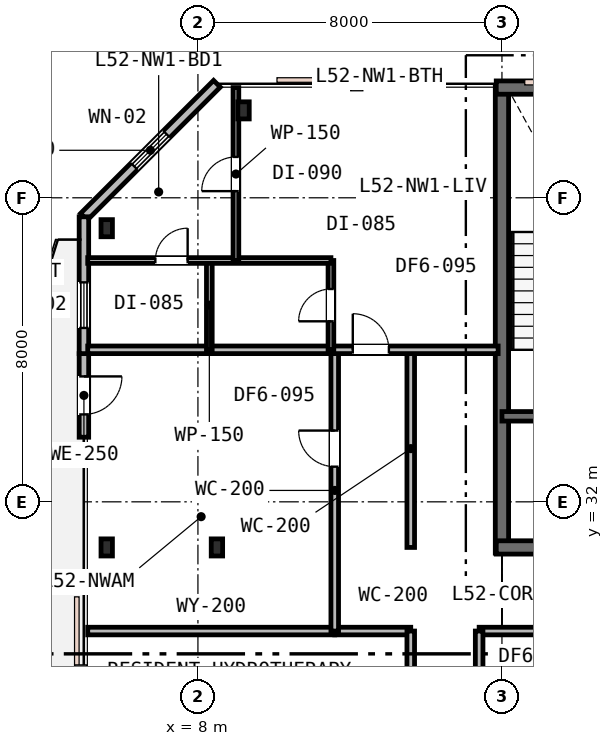
"""IFC4 building model, lengths in metres.
Left out: names, types, materials, properties, quantities, classifications, styles, units other than length and angle.
Written with IfcOpenShell. Run it as: python <this file> out.ifc"""

import sys

from ifc_helpers import new_model, si_unit, direction, frame, frame_2d, origin, origin_2d, place, context, subcontext, project, spatial, rectangle, i_section, extrude, element, fill, save


model = new_model("IFC4")
c1 = context("Model", 3, precision=1e-05, world=origin(), true_north=direction((0.0, 1.0)))
c2 = subcontext(c1, "Body", "Model", "MODEL_VIEW")
j1 = project(units=[si_unit("LENGTHUNIT", "METRE"), si_unit("PLANEANGLEUNIT", "RADIAN")], contexts=[c1])
p1 = place(None, origin())
s1 = spatial("IfcSite", under=j1, at=p1, CompositionType="ELEMENT")
p2 = place(p1, origin())
s2 = spatial("IfcBuilding", under=s1, at=p2, CompositionType="ELEMENT")
p3 = place(p2, frame((0.0, 0.0, 201.0)))
s3 = spatial("IfcBuildingStorey", under=s2, at=p3, CompositionType="ELEMENT", Elevation=201.0)
p4 = place(p3, frame((16.0, 30.65, 0.0), z_axis=(0.0, 0.0, 1.0), x_axis=(0.0, 1.0, 0.0)))
e1 = element("IfcWall", 1, at=p4, inside=s3, PredefinedType="SHEAR", context=c2, shape_type="SweptSolid", body=[
    extrude(rectangle(XDim=12.3, YDim=0.35, at=frame_2d((6.15, 0.0))), origin(), (0.0, 0.0, 1.0), 3.6),
])
p5 = place(p3, frame((15.85, 42.9, 0.0), z_axis=(0.0, 0.0, 1.0), x_axis=(1.0, 0.0, 0.0)))
e2 = element("IfcWall", 2, at=p5, inside=s3, PredefinedType="SHEAR", context=c2, shape_type="SweptSolid", body=[
    extrude(rectangle(XDim=24.3, YDim=0.35, at=frame_2d((12.15, 0.0))), origin(), (0.0, 0.0, 1.0), 3.6),
])
p6 = place(p3, frame((15.85, 30.8, 0.0), z_axis=(0.0, 0.0, 1.0), x_axis=(1.0, 0.0, 0.0)))
e3 = element("IfcWall", 3, at=p6, inside=s3, PredefinedType="SHEAR", context=c2, shape_type="SweptSolid", body=[
    extrude(rectangle(XDim=11.2, YDim=0.35, at=frame_2d((5.6, 0.0))), origin(), (0.0, 0.0, 1.0), 3.6),
])
p7 = place(p6, frame((2.45, 0.0, 0.0)))
e4 = element("IfcOpeningElement", 4, at=p7, cuts=e3, PredefinedType="OPENING", context=c2, shape_type="SweptSolid", body=[
    extrude(rectangle(XDim=1.1, YDim=2.15, at=frame_2d((0.55, 1.075))), frame((0.0, 0.185, 0.0), z_axis=(0.0, -1.0, 0.0), x_axis=(1.0, 0.0, 0.0)), (0.0, 0.0, 1.0), 0.37),
])
p8 = place(p3, frame((16.0, 34.25, 0.0), z_axis=(0.0, 0.0, 1.0), x_axis=(1.0, 0.0, 0.0)))
e5 = element("IfcWall", 5, at=p8, inside=s3, PredefinedType="SHEAR", context=c2, shape_type="SweptSolid", body=[
    extrude(rectangle(XDim=6.05, YDim=0.25, at=frame_2d((3.025, 0.0))), origin(), (0.0, 0.0, 1.0), 3.6),
])
p9 = place(p8, frame((1.25, 0.0, 0.0)))
e6 = element("IfcOpeningElement", 6, at=p9, cuts=e5, PredefinedType="OPENING", context=c2, shape_type="SweptSolid", body=[
    extrude(rectangle(XDim=1.0, YDim=2.15, at=frame_2d((0.5, 1.075))), frame((0.0, 0.135, 0.0), z_axis=(0.0, -1.0, 0.0), x_axis=(1.0, 0.0, 0.0)), (0.0, 0.0, 1.0), 0.27),
])
p10 = place(p8, frame((4.2, 0.0, 0.0)))
e7 = element("IfcOpeningElement", 7, at=p10, cuts=e5, PredefinedType="OPENING", context=c2, shape_type="SweptSolid", body=[
    extrude(rectangle(XDim=1.1, YDim=2.15, at=frame_2d((0.55, 1.075))), frame((0.0, 0.135, 0.0), z_axis=(0.0, -1.0, 0.0), x_axis=(1.0, 0.0, 0.0)), (0.0, 0.0, 1.0), 0.27),
])
for number, where, z_axis, x_axis in (
    (8, (5.6, 30.8, 0.0), (0.0, 0.0, 1.0), (1.0, 0.0, 0.0)),
    (9, (5.6, 39.2, 0.0), (0.0, 0.0, 1.0), (1.0, 0.0, 0.0)),
    (10, (8.5, 30.8, 0.0), (0.0, 0.0, 1.0), (1.0, 0.0, 0.0)),
    (11, (9.2, 42.3, 0.0), (0.0, 0.0, 1.0), (1.0, 0.0, 0.0)),
):
    element("IfcColumn", number, at=place(p3, frame(where, z_axis=z_axis, x_axis=x_axis)), inside=s3, PredefinedType="COLUMN", context=c2, shape_type="SweptSolid", body=[
        extrude(i_section(OverallWidth=0.3, OverallDepth=0.45, WebThickness=0.014, FlangeThickness=0.026, FilletRadius=0.027, at=origin_2d()), origin(), (0.0, 0.0, 1.0), 3.6),
    ])
p11 = place(p3, frame((8.5, 43.0, 0.0), z_axis=(0.0, 0.0, 1.0), x_axis=(-0.707106781187, -0.707106781187, 0.0)))
e12 = element("IfcWall", 12, at=p11, inside=s3, PredefinedType="STANDARD", context=c2, shape_type="SweptSolid", body=[
    extrude(rectangle(XDim=4.95, YDim=0.25, at=frame_2d((2.475, 0.0))), origin(), (0.0, 0.0, 1.0), 3.33),
])
p12 = place(p11, frame((1.875, 0.0, 0.85)))
e13 = element("IfcOpeningElement", 13, at=p12, cuts=e12, PredefinedType="OPENING", context=c2, shape_type="SweptSolid", body=[
    extrude(rectangle(XDim=1.2, YDim=1.6, at=frame_2d((0.6, 0.8))), frame((0.0, 0.135, 0.0), z_axis=(0.0, -1.0, 0.0), x_axis=(1.0, 0.0, 0.0)), (0.0, 0.0, 1.0), 0.27),
])
p13 = place(p3, frame((5.0, 35.9, 0.0), z_axis=(0.0, 0.0, 1.0), x_axis=(0.0, -1.0, 0.0)))
e14 = element("IfcWall", 14, at=p13, inside=s3, PredefinedType="STANDARD", context=c2, shape_type="SweptSolid", body=[
    extrude(rectangle(XDim=2.2, YDim=0.25, at=frame_2d((1.1, 0.0))), origin(), (0.0, 0.0, 1.0), 3.33),
])
p14 = place(p13, frame((0.6, 0.0, 0.0)))
e15 = element("IfcOpeningElement", 15, at=p14, cuts=e14, PredefinedType="OPENING", context=c2, shape_type="SweptSolid", body=[
    extrude(rectangle(XDim=1.0, YDim=2.15, at=frame_2d((0.5, 1.075))), frame((0.0, 0.135, 0.0), z_axis=(0.0, -1.0, 0.0), x_axis=(1.0, 0.0, 0.0)), (0.0, 0.0, 1.0), 0.27),
])
p15 = place(p3, frame((5.0, 39.5, 0.0), z_axis=(0.0, 0.0, 1.0), x_axis=(0.0, -1.0, 0.0)))
e16 = element("IfcWall", 16, at=p15, inside=s3, PredefinedType="STANDARD", context=c2, shape_type="SweptSolid", body=[
    extrude(rectangle(XDim=3.6, YDim=0.25, at=frame_2d((1.8, 0.0))), origin(), (0.0, 0.0, 1.0), 3.33),
])
p16 = place(p15, frame((1.725, 0.0, 0.85)))
e17 = element("IfcOpeningElement", 17, at=p16, cuts=e16, PredefinedType="OPENING", context=c2, shape_type="SweptSolid", body=[
    extrude(rectangle(XDim=1.2, YDim=1.6, at=frame_2d((0.6, 0.8))), frame((0.0, 0.135, 0.0), z_axis=(0.0, -1.0, 0.0), x_axis=(1.0, 0.0, 0.0)), (0.0, 0.0, 1.0), 0.27),
])
p17 = place(p3, frame((5.1, 28.6, 0.0), z_axis=(0.0, 0.0, 1.0), x_axis=(1.0, 0.0, 0.0)))
e18 = element("IfcWall", 18, at=p17, inside=s3, PredefinedType="PARTITIONING", context=c2, shape_type="SweptSolid", body=[
    extrude(rectangle(XDim=6.5, YDim=0.2, at=frame_2d((3.25, 0.0))), origin(), (0.0, 0.0, 1.0), 2.72),
])
p18 = place(p3, frame((11.6, 28.6, 0.0), z_axis=(0.0, 0.0, 1.0), x_axis=(1.0, 0.0, 0.0)))
e19 = element("IfcWall", 19, at=p18, inside=s3, PredefinedType="PARTITIONING", context=c2, shape_type="SweptSolid", body=[
    extrude(rectangle(XDim=2.0, YDim=0.2, at=frame_2d((1.0, 0.0))), origin(), (0.0, 0.0, 1.0), 3.33),
])
p19 = place(p3, frame((15.4, 28.6, 0.0), z_axis=(0.0, 0.0, 1.0), x_axis=(1.0, 0.0, 0.0)))
e20 = element("IfcWall", 20, at=p19, inside=s3, PredefinedType="PARTITIONING", context=c2, shape_type="SweptSolid", body=[
    extrude(rectangle(XDim=35.5, YDim=0.2, at=frame_2d((17.75, 0.0))), origin(), (0.0, 0.0, 1.0), 2.72),
])
p20 = place(p19, frame((11.525, 0.0, 0.0)))
e21 = element("IfcOpeningElement", 21, at=p20, cuts=e20, PredefinedType="OPENING", context=c2, shape_type="SweptSolid", body=[
    extrude(rectangle(XDim=0.95, YDim=2.15, at=frame_2d((0.475, 1.075))), frame((0.0, 0.11, 0.0), z_axis=(0.0, -1.0, 0.0), x_axis=(1.0, 0.0, 0.0)), (0.0, 0.0, 1.0), 0.22),
])
p21 = place(p19, frame((19.425, 0.0, 0.0)))
e22 = element("IfcOpeningElement", 22, at=p21, cuts=e20, PredefinedType="OPENING", context=c2, shape_type="SweptSolid", body=[
    extrude(rectangle(XDim=0.95, YDim=2.15, at=frame_2d((0.475, 1.075))), frame((0.0, 0.11, 0.0), z_axis=(0.0, -1.0, 0.0), x_axis=(1.0, 0.0, 0.0)), (0.0, 0.0, 1.0), 0.22),
])
p22 = place(p19, frame((26.275, 0.0, 0.0)))
e23 = element("IfcOpeningElement", 23, at=p22, cuts=e20, PredefinedType="OPENING", context=c2, shape_type="SweptSolid", body=[
    extrude(rectangle(XDim=0.95, YDim=2.15, at=frame_2d((0.475, 1.075))), frame((0.0, 0.11, 0.0), z_axis=(0.0, -1.0, 0.0), x_axis=(1.0, 0.0, 0.0)), (0.0, 0.0, 1.0), 0.22),
])
p23 = place(p3, frame((13.6, 30.8, 0.0), z_axis=(0.0, 0.0, 1.0), x_axis=(0.0, 1.0, 0.0)))
e24 = element("IfcWall", 24, at=p23, inside=s3, PredefinedType="PARTITIONING", context=c2, shape_type="SweptSolid", body=[
    extrude(rectangle(XDim=5.2, YDim=0.2, at=frame_2d((2.6, 0.0))), origin(), (0.0, 0.0, 1.0), 2.72),
])
p24 = place(p3, frame((11.6, 28.6, 0.0), z_axis=(0.0, 0.0, 1.0), x_axis=(0.0, 1.0, 0.0)))
e25 = element("IfcWall", 25, at=p24, inside=s3, PredefinedType="PARTITIONING", context=c2, shape_type="SweptSolid", body=[
    extrude(rectangle(XDim=7.4, YDim=0.2, at=frame_2d((3.7, 0.0))), origin(), (0.0, 0.0, 1.0), 2.72),
])
p25 = place(p24, frame((4.325, 0.0, 0.0)))
e26 = element("IfcOpeningElement", 26, at=p25, cuts=e25, PredefinedType="OPENING", context=c2, shape_type="SweptSolid", body=[
    extrude(rectangle(XDim=0.95, YDim=2.15, at=frame_2d((0.475, 1.075))), frame((0.0, 0.11, 0.0), z_axis=(0.0, -1.0, 0.0), x_axis=(1.0, 0.0, 0.0)), (0.0, 0.0, 1.0), 0.22),
])
p26 = place(p3, frame((5.1, 36.0, 0.0), z_axis=(0.0, 0.0, 1.0), x_axis=(1.0, 0.0, 0.0)))
e27 = element("IfcWall", 27, at=p26, inside=s3, PredefinedType="PARTITIONING", context=c2, shape_type="SweptSolid", body=[
    extrude(rectangle(XDim=10.8, YDim=0.2, at=frame_2d((5.4, 0.0))), origin(), (0.0, 0.0, 1.0), 3.04),
])
p27 = place(p26, frame((6.975, 0.0, 0.0)))
e28 = element("IfcOpeningElement", 28, at=p27, cuts=e27, PredefinedType="OPENING", context=c2, shape_type="SweptSolid", body=[
    extrude(rectangle(XDim=0.95, YDim=2.15, at=frame_2d((0.475, 1.075))), frame((0.0, 0.11, 0.0), z_axis=(0.0, -1.0, 0.0), x_axis=(1.0, 0.0, 0.0)), (0.0, 0.0, 1.0), 0.22),
])
p28 = place(p3, frame((11.5, 36.0, 0.0), z_axis=(0.0, 0.0, 1.0), x_axis=(0.0, 1.0, 0.0)))
e29 = element("IfcWall", 29, at=p28, inside=s3, PredefinedType="PARTITIONING", context=c2, shape_type="SweptSolid", body=[
    extrude(rectangle(XDim=2.35, YDim=0.15, at=frame_2d((1.175, 0.0))), origin(), (0.0, 0.0, 1.0), 3.33),
])
p29 = place(p28, frame((0.75, 0.0, 0.0)))
e30 = element("IfcOpeningElement", 30, at=p29, cuts=e29, PredefinedType="OPENING", context=c2, shape_type="SweptSolid", body=[
    extrude(rectangle(XDim=0.85, YDim=2.15, at=frame_2d((0.425, 1.075))), frame((0.0, 0.085, 0.0), z_axis=(0.0, -1.0, 0.0), x_axis=(1.0, 0.0, 0.0)), (0.0, 0.0, 1.0), 0.17),
])
p30 = place(p3, frame((8.3, 36.0, 0.0), z_axis=(0.0, 0.0, 1.0), x_axis=(0.0, 1.0, 0.0)))
e31 = element("IfcWall", 31, at=p30, inside=s3, PredefinedType="PARTITIONING", context=c2, shape_type="SweptSolid", body=[
    extrude(rectangle(XDim=2.35, YDim=0.15, at=frame_2d((1.175, 0.0))), origin(), (0.0, 0.0, 1.0), 3.33),
])
p31 = place(p3, frame((5.1, 38.35, 0.0), z_axis=(0.0, 0.0, 1.0), x_axis=(1.0, 0.0, 0.0)))
e32 = element("IfcWall", 32, at=p31, inside=s3, PredefinedType="PARTITIONING", context=c2, shape_type="SweptSolid", body=[
    extrude(rectangle(XDim=6.4, YDim=0.15, at=frame_2d((3.2, 0.0))), origin(), (0.0, 0.0, 1.0), 3.04),
])
p32 = place(p31, frame((1.78, 0.0, 0.0)))
e33 = element("IfcOpeningElement", 33, at=p32, cuts=e32, PredefinedType="OPENING", context=c2, shape_type="SweptSolid", body=[
    extrude(rectangle(XDim=0.85, YDim=2.15, at=frame_2d((0.425, 1.075))), frame((0.0, 0.085, 0.0), z_axis=(0.0, -1.0, 0.0), x_axis=(1.0, 0.0, 0.0)), (0.0, 0.0, 1.0), 0.17),
])
p33 = place(p3, frame((9.0, 38.35, 0.0), z_axis=(0.0, 0.0, 1.0), x_axis=(0.0, 1.0, 0.0)))
e34 = element("IfcWall", 34, at=p33, inside=s3, PredefinedType="PARTITIONING", context=c2, shape_type="SweptSolid", body=[
    extrude(rectangle(XDim=4.55, YDim=0.15, at=frame_2d((2.275, 0.0))), origin(), (0.0, 0.0, 1.0), 3.04),
])
p34 = place(p33, frame((1.825, 0.0, 0.0)))
e35 = element("IfcOpeningElement", 35, at=p34, cuts=e34, PredefinedType="OPENING", context=c2, shape_type="SweptSolid", body=[
    extrude(rectangle(XDim=0.9, YDim=2.15, at=frame_2d((0.45, 1.075))), frame((0.0, 0.085, 0.0), z_axis=(0.0, -1.0, 0.0), x_axis=(1.0, 0.0, 0.0)), (0.0, 0.0, 1.0), 0.17),
])
p35 = place(p3, frame((13.6, 17.0, 0.0), z_axis=(0.0, 0.0, 1.0), x_axis=(0.0, 1.0, 0.0)))
e36 = element("IfcWall", 36, at=p35, inside=s3, PredefinedType="PARTITIONING", context=c2, shape_type="SweptSolid", body=[
    extrude(rectangle(XDim=11.6, YDim=0.2, at=frame_2d((5.8, 0.0))), origin(), (0.0, 0.0, 1.0), 2.72),
])
p36 = place(p35, frame((8.996, 0.0, 0.0)))
e37 = element("IfcOpeningElement", 37, at=p36, cuts=e36, PredefinedType="OPENING", context=c2, shape_type="SweptSolid", body=[
    extrude(rectangle(XDim=0.95, YDim=2.15, at=frame_2d((0.475, 1.075))), frame((0.0, 0.11, 0.0), z_axis=(0.0, -1.0, 0.0), x_axis=(1.0, 0.0, 0.0)), (0.0, 0.0, 1.0), 0.22),
])
p37 = place(p35, frame((2.269, 0.0, 0.0)))
e38 = element("IfcOpeningElement", 38, at=p37, cuts=e36, PredefinedType="OPENING", context=c2, shape_type="SweptSolid", body=[
    extrude(rectangle(XDim=0.95, YDim=2.15, at=frame_2d((0.475, 1.075))), frame((0.0, 0.11, 0.0), z_axis=(0.0, -1.0, 0.0), x_axis=(1.0, 0.0, 0.0)), (0.0, 0.0, 1.0), 0.22),
])
p38 = place(p3, frame((15.4, 17.0, 0.0), z_axis=(0.0, 0.0, 1.0), x_axis=(0.0, 1.0, 0.0)))
e39 = element("IfcWall", 39, at=p38, inside=s3, PredefinedType="PARTITIONING", context=c2, shape_type="SweptSolid", body=[
    extrude(rectangle(XDim=11.6, YDim=0.2, at=frame_2d((5.8, 0.0))), origin(), (0.0, 0.0, 1.0), 2.72),
])
p39 = place(p38, frame((9.095, 0.0, 0.0)))
e40 = element("IfcOpeningElement", 40, at=p39, cuts=e39, PredefinedType="OPENING", context=c2, shape_type="SweptSolid", body=[
    extrude(rectangle(XDim=0.95, YDim=2.15, at=frame_2d((0.475, 1.075))), frame((0.0, 0.11, 0.0), z_axis=(0.0, -1.0, 0.0), x_axis=(1.0, 0.0, 0.0)), (0.0, 0.0, 1.0), 0.22),
])
p40 = place(p38, frame((3.295, 0.0, 0.0)))
e41 = element("IfcOpeningElement", 41, at=p40, cuts=e39, PredefinedType="OPENING", context=c2, shape_type="SweptSolid", body=[
    extrude(rectangle(XDim=0.95, YDim=2.15, at=frame_2d((0.475, 1.075))), frame((0.0, 0.11, 0.0), z_axis=(0.0, -1.0, 0.0), x_axis=(1.0, 0.0, 0.0)), (0.0, 0.0, 1.0), 0.22),
])
p41 = place(p12, origin())
e42 = element("IfcWindow", 42, at=p41, inside=s3, PartitioningType="SINGLE_PANEL", PredefinedType="WINDOW", context=c2, shape_type="SweptSolid", body=[
    extrude(rectangle(XDim=1.2, YDim=1.6, at=frame_2d((0.6, 0.8))), frame((0.0, 0.03, 0.0), z_axis=(0.0, -1.0, 0.0), x_axis=(1.0, 0.0, 0.0)), (0.0, 0.0, 1.0), 0.06),
])
fill(e13, e42)
p42 = place(p14, origin())
e43 = element("IfcDoor", 43, at=p42, inside=s3, OperationType="SINGLE_SWING_LEFT", PredefinedType="DOOR", context=c2, shape_type="SweptSolid", body=[
    extrude(rectangle(XDim=1.0, YDim=2.15, at=frame_2d((0.5, 1.075))), frame((0.0, 0.025, 0.0), z_axis=(0.0, -1.0, 0.0), x_axis=(1.0, 0.0, 0.0)), (0.0, 0.0, 1.0), 0.05),
])
fill(e15, e43)
p43 = place(p16, origin())
e44 = element("IfcWindow", 44, at=p43, inside=s3, PartitioningType="SINGLE_PANEL", PredefinedType="WINDOW", context=c2, shape_type="SweptSolid", body=[
    extrude(rectangle(XDim=1.2, YDim=1.6, at=frame_2d((0.6, 0.8))), frame((0.0, 0.03, 0.0), z_axis=(0.0, -1.0, 0.0), x_axis=(1.0, 0.0, 0.0)), (0.0, 0.0, 1.0), 0.06),
])
fill(e17, e44)
p44 = place(p25, origin())
e45 = element("IfcDoor", 45, at=p44, inside=s3, OperationType="SINGLE_SWING_RIGHT", PredefinedType="DOOR", context=c2, shape_type="SweptSolid", body=[
    extrude(rectangle(XDim=0.95, YDim=2.15, at=frame_2d((0.475, 1.075))), frame((0.0, 0.025, 0.0), z_axis=(0.0, -1.0, 0.0), x_axis=(1.0, 0.0, 0.0)), (0.0, 0.0, 1.0), 0.05),
])
fill(e26, e45)
p45 = place(p27, origin())
e46 = element("IfcDoor", 46, at=p45, inside=s3, OperationType="SINGLE_SWING_LEFT", PredefinedType="DOOR", context=c2, shape_type="SweptSolid", body=[
    extrude(rectangle(XDim=0.95, YDim=2.15, at=frame_2d((0.475, 1.075))), frame((0.0, 0.025, 0.0), z_axis=(0.0, -1.0, 0.0), x_axis=(1.0, 0.0, 0.0)), (0.0, 0.0, 1.0), 0.05),
])
fill(e28, e46)
p46 = place(p29, origin())
e47 = element("IfcDoor", 47, at=p46, inside=s3, OperationType="SINGLE_SWING_LEFT", PredefinedType="DOOR", context=c2, shape_type="SweptSolid", body=[
    extrude(rectangle(XDim=0.85, YDim=2.15, at=frame_2d((0.425, 1.075))), frame((0.0, 0.025, 0.0), z_axis=(0.0, -1.0, 0.0), x_axis=(1.0, 0.0, 0.0)), (0.0, 0.0, 1.0), 0.05),
])
fill(e30, e47)
p47 = place(p32, origin())
e48 = element("IfcDoor", 48, at=p47, inside=s3, OperationType="SINGLE_SWING_RIGHT", PredefinedType="DOOR", context=c2, shape_type="SweptSolid", body=[
    extrude(rectangle(XDim=0.85, YDim=2.15, at=frame_2d((0.425, 1.075))), frame((0.0, 0.025, 0.0), z_axis=(0.0, -1.0, 0.0), x_axis=(1.0, 0.0, 0.0)), (0.0, 0.0, 1.0), 0.05),
])
fill(e33, e48)
p48 = place(p34, origin())
e49 = element("IfcDoor", 49, at=p48, inside=s3, OperationType="SINGLE_SWING_LEFT", PredefinedType="DOOR", context=c2, shape_type="SweptSolid", body=[
    extrude(rectangle(XDim=0.9, YDim=2.15, at=frame_2d((0.45, 1.075))), frame((0.0, 0.025, 0.0), z_axis=(0.0, -1.0, 0.0), x_axis=(1.0, 0.0, 0.0)), (0.0, 0.0, 1.0), 0.05),
])
fill(e35, e49)
save(model, sys.argv[1])
